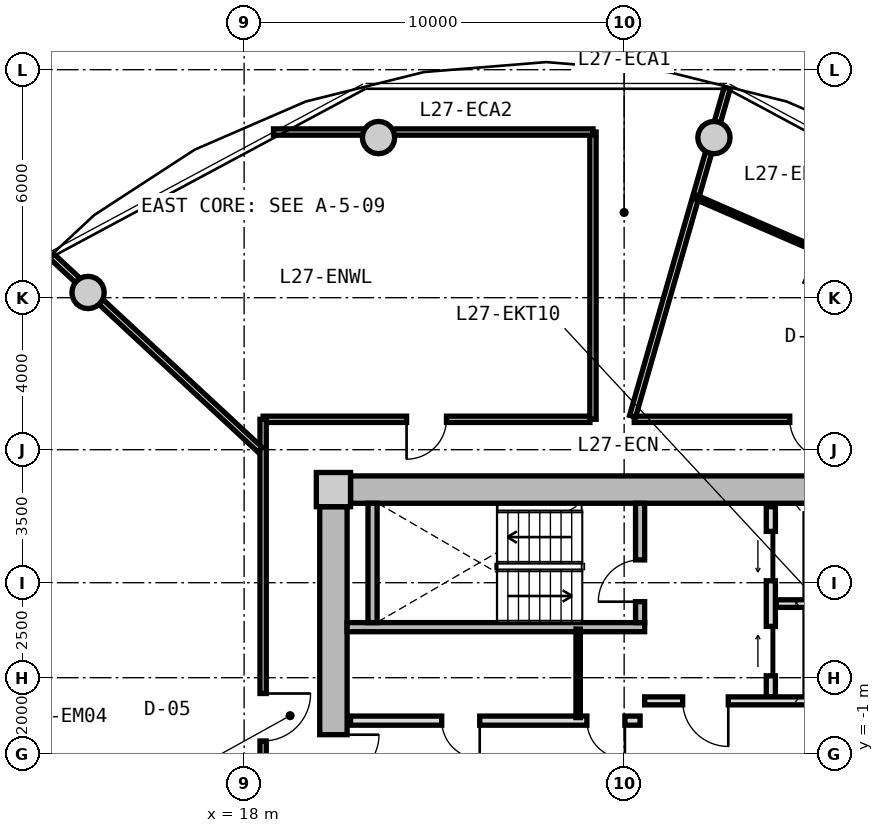
"""IFC4 building model, lengths in metres.
Left out: names, types, materials, properties, quantities, classifications, styles, units other than length and angle.
Written with IfcOpenShell. Run it as: python <this file> out.ifc"""

import sys

from ifc_helpers import new_model, si_unit, direction, frame, frame_2d, origin, origin_2d, place, context, subcontext, project, spatial, rectangle, circle, extrude, source, transform, mapped, element, fill, save


model = new_model("IFC4")
c1 = context("Model", 3, precision=1e-05, world=origin(), true_north=direction((0.0, 1.0)))
c2 = subcontext(c1, "Body", "Model", "MODEL_VIEW")
j1 = project(units=[si_unit("LENGTHUNIT", "METRE"), si_unit("PLANEANGLEUNIT", "RADIAN")], contexts=[c1])
p1 = place(None, origin())
s1 = spatial("IfcSite", under=j1, at=p1, CompositionType="ELEMENT")
p2 = place(p1, origin())
s2 = spatial("IfcBuilding", under=s1, at=p2, CompositionType="ELEMENT")
p3 = place(p2, frame((0.0, 0.0, 90.15)))
s3 = spatial("IfcBuildingStorey", under=s2, at=p3, CompositionType="ELEMENT", Elevation=90.15)
m1 = source(origin(), c2, "Body", "SweptSolid", [
    extrude(rectangle(XDim=0.9, YDim=0.9, at=origin_2d()), origin(), (0.0, 0.0, 1.0), 3.05),
])
p4 = place(p3, frame((20.35, 5.95, 0.0), z_axis=(0.0, 0.0, 1.0), x_axis=(1.0, 0.0, 0.0)))
e1 = element("IfcColumn", 1, at=p4, inside=s3, PredefinedType="COLUMN", context=c2, shape_type="MappedRepresentation", body=[
    mapped(m1, transform((0.0, 0.0, 0.0), x_axis=(1.0, 0.0, 0.0), y_axis=(0.0, 1.0, 0.0), z_axis=(0.0, 0.0, 1.0), scale=1.0)),
])
m2 = source(origin(), c2, "Body", "SweptSolid", [
    extrude(rectangle(XDim=14.4, YDim=0.72, at=frame_2d((7.2, 0.0))), origin(), (0.0, 0.0, 1.0), 2.79),
])
p5 = place(p3, frame((20.8, 5.95, 0.0), z_axis=(0.0, 0.0, 1.0), x_axis=(1.0, 0.0, 0.0)))
e2 = element("IfcWall", 2, at=p5, inside=s3, PredefinedType="SHEAR", context=c2, shape_type="MappedRepresentation", body=[
    mapped(m2, transform((0.0, 0.0, 0.0), x_axis=(1.0, 0.0, 0.0), y_axis=(0.0, 1.0, 0.0), z_axis=(0.0, 0.0, 1.0), scale=1.0)),
])
m3 = source(origin(), c2, "Body", "SweptSolid", [
    extrude(rectangle(XDim=11.0, YDim=0.72, at=frame_2d((5.5, 0.0))), origin(), (0.0, 0.0, 1.0), 2.79),
])
p6 = place(p3, frame((20.35, -5.5, 0.0), z_axis=(0.0, 0.0, 1.0), x_axis=(0.0, 1.0, 0.0)))
e3 = element("IfcWall", 3, at=p6, inside=s3, PredefinedType="SHEAR", context=c2, shape_type="MappedRepresentation", body=[
    mapped(m3, transform((0.0, 0.0, 0.0), x_axis=(1.0, 0.0, 0.0), y_axis=(0.0, 1.0, 0.0), z_axis=(0.0, 0.0, 1.0), scale=1.0)),
])
p7 = place(p6, frame((3.8, 0.0, 0.0)))
e4 = element("IfcOpeningElement", 4, at=p7, cuts=e3, PredefinedType="OPENING", context=c2, shape_type="SweptSolid", body=[
    extrude(rectangle(XDim=1.2, YDim=2.15, at=frame_2d((0.6, 1.075))), frame((0.0, 0.37, 0.0), z_axis=(0.0, -1.0, 0.0), x_axis=(1.0, 0.0, 0.0)), (0.0, 0.0, 1.0), 0.74),
])
m4 = source(origin(), c2, "Body", "SweptSolid", [
    extrude(circle(Radius=0.425, at=origin_2d()), origin(), (0.0, 0.0, 1.0), 3.05),
])
for number, where, z_axis, x_axis in (
    (5, (30.363, 15.213, 0.0), (0.0, 0.0, 1.0), (1.0, 0.0, 0.0)),
    (6, (21.537, 15.213, 0.0), (0.0, 0.0, 1.0), (1.0, 0.0, 0.0)),
    (7, (13.894, 11.137, 0.0), (0.0, 0.0, 1.0), (1.0, 0.0, 0.0)),
):
    element("IfcColumn", number, at=place(p3, frame(where, z_axis=z_axis, x_axis=x_axis)), inside=s3, PredefinedType="COLUMN", context=c2, shape_type="MappedRepresentation", body=[
        mapped(m4, transform((0.0, 0.0, 0.0), x_axis=(1.0, 0.0, 0.0), y_axis=(0.0, 1.0, 0.0), z_axis=(0.0, 0.0, 1.0), scale=1.0)),
    ])
m5 = source(origin(), c2, "Body", "SweptSolid", [
    extrude(rectangle(XDim=7.83, YDim=0.24, at=frame_2d((3.915, 0.0))), origin(), (0.0, 0.0, 1.0), 2.79),
])
p8 = place(p3, frame((20.71, 2.33, 0.0), z_axis=(0.0, 0.0, 1.0), x_axis=(1.0, 0.0, 0.0)))
e8 = element("IfcWall", 8, at=p8, inside=s3, PredefinedType="PARTITIONING", context=c2, shape_type="MappedRepresentation", body=[
    mapped(m5, transform((0.0, 0.0, 0.0), x_axis=(1.0, 0.0, 0.0), y_axis=(0.0, 1.0, 0.0), z_axis=(0.0, 0.0, 1.0), scale=1.0)),
])
m6 = source(origin(), c2, "Body", "SweptSolid", [
    extrude(rectangle(XDim=3.14, YDim=0.24, at=frame_2d((1.57, 0.0))), origin(), (0.0, 0.0, 1.0), 2.79),
])
p9 = place(p3, frame((21.38, 2.45, 0.0), z_axis=(0.0, 0.0, 1.0), x_axis=(0.0, 1.0, 0.0)))
e9 = element("IfcWall", 9, at=p9, inside=s3, PredefinedType="PARTITIONING", context=c2, shape_type="MappedRepresentation", body=[
    mapped(m6, transform((0.0, 0.0, 0.0), x_axis=(1.0, 0.0, 0.0), y_axis=(0.0, 1.0, 0.0), z_axis=(0.0, 0.0, 1.0), scale=1.0)),
])
p10 = place(p3, frame((28.42, 2.45, 0.0), z_axis=(0.0, 0.0, 1.0), x_axis=(0.0, 1.0, 0.0)))
e10 = element("IfcWall", 10, at=p10, inside=s3, PredefinedType="PARTITIONING", context=c2, shape_type="MappedRepresentation", body=[
    mapped(m6, transform((0.0, 0.0, 0.0), x_axis=(1.0, 0.0, 0.0), y_axis=(0.0, 1.0, 0.0), z_axis=(0.0, 0.0, 1.0), scale=1.0)),
])
p11 = place(p10, frame((0.55, 0.0, 0.0)))
e11 = element("IfcOpeningElement", 11, at=p11, cuts=e10, PredefinedType="OPENING", context=c2, shape_type="SweptSolid", body=[
    extrude(rectangle(XDim=1.1, YDim=2.15, at=frame_2d((0.55, 1.075))), frame((0.0, 0.13, 0.0), z_axis=(0.0, -1.0, 0.0), x_axis=(1.0, 0.0, 0.0)), (0.0, 0.0, 1.0), 0.26),
])
m7 = source(origin(), c2, "Body", "SweptSolid", [
    extrude(rectangle(XDim=5.0, YDim=0.24, at=frame_2d((2.5, 0.0))), origin(), (0.0, 0.0, 1.0), 2.775),
])
p12 = place(p3, frame((31.86, 0.5, 0.0), z_axis=(0.0, 0.0, 1.0), x_axis=(0.0, 1.0, 0.0)))
e12 = element("IfcWall", 12, at=p12, inside=s3, PredefinedType="PARTITIONING", context=c2, shape_type="MappedRepresentation", body=[
    mapped(m7, transform((0.0, 0.0, 0.0), x_axis=(1.0, 0.0, 0.0), y_axis=(0.0, 1.0, 0.0), z_axis=(0.0, 0.0, 1.0), scale=1.0)),
])
p13 = place(p12, frame((3.05, 0.0, 0.0)))
e13 = element("IfcOpeningElement", 13, at=p13, cuts=e12, PredefinedType="OPENING", context=c2, shape_type="SweptSolid", body=[
    extrude(rectangle(XDim=1.3, YDim=2.2, at=frame_2d((0.65, 1.1))), frame((0.0, 0.13, 0.0), z_axis=(0.0, -1.0, 0.0), x_axis=(1.0, 0.0, 0.0)), (0.0, 0.0, 1.0), 0.26),
])
p14 = place(p12, frame((0.55, 0.0, 0.0)))
e14 = element("IfcOpeningElement", 14, at=p14, cuts=e12, PredefinedType="OPENING", context=c2, shape_type="SweptSolid", body=[
    extrude(rectangle(XDim=1.3, YDim=2.2, at=frame_2d((0.65, 1.1))), frame((0.0, 0.13, 0.0), z_axis=(0.0, -1.0, 0.0), x_axis=(1.0, 0.0, 0.0)), (0.0, 0.0, 1.0), 0.26),
])
m8 = source(origin(), c2, "Body", "SweptSolid", [
    extrude(rectangle(XDim=3.2, YDim=0.2, at=frame_2d((1.6, 0.0))), origin(), (0.0, 0.0, 1.0), 2.775),
])
p15 = place(p3, frame((32.0, 2.95, 0.0), z_axis=(0.0, 0.0, 1.0), x_axis=(1.0, 0.0, 0.0)))
e15 = element("IfcWall", 15, at=p15, inside=s3, PredefinedType="PARTITIONING", context=c2, shape_type="MappedRepresentation", body=[
    mapped(m8, transform((0.0, 0.0, 0.0), x_axis=(1.0, 0.0, 0.0), y_axis=(0.0, 1.0, 0.0), z_axis=(0.0, 0.0, 1.0), scale=1.0)),
])
m9 = source(origin(), c2, "Body", "SweptSolid", [
    extrude(rectangle(XDim=6.66, YDim=0.21, at=frame_2d((3.33, 0.0))), origin(), (0.0, 0.0, 1.0), 2.775),
])
p16 = place(p3, frame((28.54, 0.39, 0.0), z_axis=(0.0, 0.0, 1.0), x_axis=(1.0, 0.0, 0.0)))
e16 = element("IfcWall", 16, at=p16, inside=s3, PredefinedType="PARTITIONING", context=c2, shape_type="MappedRepresentation", body=[
    mapped(m9, transform((0.0, 0.0, 0.0), x_axis=(1.0, 0.0, 0.0), y_axis=(0.0, 1.0, 0.0), z_axis=(0.0, 0.0, 1.0), scale=1.0)),
])
p17 = place(p16, frame((1.0, 0.0, 0.0)))
e17 = element("IfcOpeningElement", 17, at=p17, cuts=e16, PredefinedType="OPENING", context=c2, shape_type="SweptSolid", body=[
    extrude(rectangle(XDim=1.2, YDim=2.15, at=frame_2d((0.6, 1.075))), frame((0.0, 0.115, 0.0), z_axis=(0.0, -1.0, 0.0), x_axis=(1.0, 0.0, 0.0)), (0.0, 0.0, 1.0), 0.23),
])
m10 = source(origin(), c2, "Body", "SweptSolid", [
    extrude(rectangle(XDim=7.62, YDim=0.24, at=frame_2d((3.81, 0.0))), origin(), (0.0, 0.0, 1.0), 2.775),
])
p18 = place(p3, frame((20.8, -0.13, 0.0), z_axis=(0.0, 0.0, 1.0), x_axis=(1.0, 0.0, 0.0)))
e18 = element("IfcWall", 18, at=p18, inside=s3, PredefinedType="PARTITIONING", context=c2, shape_type="MappedRepresentation", body=[
    mapped(m10, transform((0.0, 0.0, 0.0), x_axis=(1.0, 0.0, 0.0), y_axis=(0.0, 1.0, 0.0), z_axis=(0.0, 0.0, 1.0), scale=1.0)),
])
p19 = place(p18, frame((6.22, 0.0, 0.0)))
e19 = element("IfcOpeningElement", 19, at=p19, cuts=e18, PredefinedType="OPENING", context=c2, shape_type="SweptSolid", body=[
    extrude(rectangle(XDim=1.0, YDim=2.1, at=frame_2d((0.5, 1.05))), frame((0.0, 0.13, 0.0), z_axis=(0.0, -1.0, 0.0), x_axis=(1.0, 0.0, 0.0)), (0.0, 0.0, 1.0), 0.26),
])
p20 = place(p18, frame((2.4, 0.0, 0.0)))
e20 = element("IfcOpeningElement", 20, at=p20, cuts=e18, PredefinedType="OPENING", context=c2, shape_type="SweptSolid", body=[
    extrude(rectangle(XDim=1.0, YDim=2.1, at=frame_2d((0.5, 1.05))), frame((0.0, 0.13, 0.0), z_axis=(0.0, -1.0, 0.0), x_axis=(1.0, 0.0, 0.0)), (0.0, 0.0, 1.0), 0.26),
])
m11 = source(origin(), c2, "Body", "SweptSolid", [
    extrude(rectangle(XDim=2.33, YDim=0.115, at=frame_2d((1.165, 0.0))), origin(), (0.0, 0.0, 1.0), 2.775),
])
p21 = place(p3, frame((26.79, -0.05, 0.0), z_axis=(0.0, 0.0, 1.0), x_axis=(0.0, 1.0, 0.0)))
e21 = element("IfcWall", 21, at=p21, inside=s3, PredefinedType="PARTITIONING", context=c2, shape_type="MappedRepresentation", body=[
    mapped(m11, transform((0.0, 0.0, 0.0), x_axis=(1.0, 0.0, 0.0), y_axis=(0.0, 1.0, 0.0), z_axis=(0.0, 0.0, 1.0), scale=1.0)),
])
m12 = source(origin(), c2, "Body", "SweptSolid", [
    extrude(rectangle(XDim=8.6, YDim=0.165, at=frame_2d((4.3, 0.0))), origin(), (0.0, 0.0, 1.0), 2.775),
])
p22 = place(p3, frame((18.5, 7.8, 0.0), z_axis=(0.0, 0.0, 1.0), x_axis=(1.0, 0.0, 0.0)))
e22 = element("IfcWall", 22, at=p22, inside=s3, PredefinedType="PARTITIONING", context=c2, shape_type="MappedRepresentation", body=[
    mapped(m12, transform((0.0, 0.0, 0.0), x_axis=(1.0, 0.0, 0.0), y_axis=(0.0, 1.0, 0.0), z_axis=(0.0, 0.0, 1.0), scale=1.0)),
])
p23 = place(p22, frame((3.775, 0.0, 0.0)))
e23 = element("IfcOpeningElement", 23, at=p23, cuts=e22, PredefinedType="OPENING", context=c2, shape_type="SweptSolid", body=[
    extrude(rectangle(XDim=1.05, YDim=2.15, at=frame_2d((0.525, 1.075))), frame((0.0, 0.093, 0.0), z_axis=(0.0, -1.0, 0.0), x_axis=(1.0, 0.0, 0.0)), (0.0, 0.0, 1.0), 0.185),
])
m13 = source(origin(), c2, "Body", "SweptSolid", [
    extrude(rectangle(XDim=9.234, YDim=0.165, at=frame_2d((4.617, 0.0))), origin(), (0.0, 0.0, 1.0), 2.775),
])
p24 = place(p3, frame((28.266, 7.8, 0.0), z_axis=(0.0, 0.0, 1.0), x_axis=(1.0, 0.0, 0.0)))
e24 = element("IfcWall", 24, at=p24, inside=s3, PredefinedType="PARTITIONING", context=c2, shape_type="MappedRepresentation", body=[
    mapped(m13, transform((0.0, 0.0, 0.0), x_axis=(1.0, 0.0, 0.0), y_axis=(0.0, 1.0, 0.0), z_axis=(0.0, 0.0, 1.0), scale=1.0)),
])
p25 = place(p24, frame((4.092, 0.0, 0.0)))
e25 = element("IfcOpeningElement", 25, at=p25, cuts=e24, PredefinedType="OPENING", context=c2, shape_type="SweptSolid", body=[
    extrude(rectangle(XDim=1.05, YDim=2.15, at=frame_2d((0.525, 1.075))), frame((0.0, 0.093, 0.0), z_axis=(0.0, -1.0, 0.0), x_axis=(1.0, 0.0, 0.0)), (0.0, 0.0, 1.0), 0.185),
])
m14 = source(origin(), c2, "Body", "SweptSolid", [
    extrude(rectangle(XDim=15.6, YDim=0.165, at=frame_2d((7.8, 0.0))), origin(), (0.0, 0.0, 1.0), 2.775),
])
p26 = place(p3, frame((18.5, -7.8, 0.0), z_axis=(0.0, 0.0, 1.0), x_axis=(0.0, 1.0, 0.0)))
e26 = element("IfcWall", 26, at=p26, inside=s3, PredefinedType="PARTITIONING", context=c2, shape_type="MappedRepresentation", body=[
    mapped(m14, transform((0.0, 0.0, 0.0), x_axis=(1.0, 0.0, 0.0), y_axis=(0.0, 1.0, 0.0), z_axis=(0.0, 0.0, 1.0), scale=1.0)),
])
p27 = place(p26, frame((7.134, 0.0, 0.0)))
e27 = element("IfcOpeningElement", 27, at=p27, cuts=e26, PredefinedType="OPENING", context=c2, shape_type="SweptSolid", body=[
    extrude(rectangle(XDim=1.25, YDim=2.2, at=frame_2d((0.625, 1.1))), frame((0.0, 0.093, 0.0), z_axis=(0.0, -1.0, 0.0), x_axis=(1.0, 0.0, 0.0)), (0.0, 0.0, 1.0), 0.185),
])
m15 = source(origin(), c2, "Body", "SweptSolid", [
    extrude(rectangle(XDim=8.989, YDim=0.165, at=frame_2d((4.495, 0.0))), origin(), (0.0, 0.0, 1.0), 2.275),
])
p28 = place(p3, frame((28.222, 7.88, 0.0), z_axis=(0.0, 0.0, 1.0), x_axis=(0.27702323008, 0.960863221274, 0.0)))
e28 = element("IfcWall", 28, at=p28, inside=s3, PredefinedType="PARTITIONING", context=c2, shape_type="MappedRepresentation", body=[
    mapped(m15, transform((0.0, 0.0, 0.0), x_axis=(1.0, 0.0, 0.0), y_axis=(0.0, 1.0, 0.0), z_axis=(0.0, 0.0, 1.0), scale=1.0)),
])
m16 = source(origin(), c2, "Body", "SweptSolid", [
    extrude(rectangle(XDim=7.482, YDim=0.165, at=frame_2d((3.741, 0.0))), origin(), (0.0, 0.0, 1.0), 2.275),
])
p29 = place(p3, frame((18.42, 6.998, 0.0), z_axis=(0.0, 0.0, 1.0), x_axis=(-0.732508698043, 0.680757671489, 0.0)))
e29 = element("IfcWall", 29, at=p29, inside=s3, PredefinedType="PARTITIONING", context=c2, shape_type="MappedRepresentation", body=[
    mapped(m16, transform((0.0, 0.0, 0.0), x_axis=(1.0, 0.0, 0.0), y_axis=(0.0, 1.0, 0.0), z_axis=(0.0, 0.0, 1.0), scale=1.0)),
])
m17 = source(origin(), c2, "Body", "SweptSolid", [
    extrude(rectangle(XDim=7.56, YDim=0.165, at=frame_2d((3.78, 0.0))), origin(), (0.0, 0.0, 1.0), 2.775),
])
p30 = place(p3, frame((27.18, 7.8, 0.0), z_axis=(0.0, 0.0, 1.0), x_axis=(0.0, 1.0, 0.0)))
e30 = element("IfcWall", 30, at=p30, inside=s3, PredefinedType="PARTITIONING", context=c2, shape_type="MappedRepresentation", body=[
    mapped(m17, transform((0.0, 0.0, 0.0), x_axis=(1.0, 0.0, 0.0), y_axis=(0.0, 1.0, 0.0), z_axis=(0.0, 0.0, 1.0), scale=1.0)),
])
m18 = source(origin(), c2, "Body", "SweptSolid", [
    extrude(rectangle(XDim=8.407, YDim=0.165, at=frame_2d((4.204, 0.0))), origin(), (0.0, 0.0, 1.0), 2.275),
])
p31 = place(p3, frame((18.773, 15.36, 0.0), z_axis=(0.0, 0.0, 1.0), x_axis=(1.0, 0.0, 0.0)))
e31 = element("IfcWall", 31, at=p31, inside=s3, PredefinedType="PARTITIONING", context=c2, shape_type="MappedRepresentation", body=[
    mapped(m18, transform((0.0, 0.0, 0.0), x_axis=(1.0, 0.0, 0.0), y_axis=(0.0, 1.0, 0.0), z_axis=(0.0, 0.0, 1.0), scale=1.0)),
])
m19 = source(origin(), c2, "Body", "SweptSolid", [
    extrude(rectangle(XDim=7.938, YDim=0.115, at=frame_2d((3.969, 0.0))), origin(), (0.0, 0.0, 1.0), 2.775),
])
p32 = place(p3, frame((37.164, 10.479, 0.0), z_axis=(0.0, 0.0, 1.0), x_axis=(-0.917052940979, 0.398765474235, 0.0)))
e32 = element("IfcWall", 32, at=p32, inside=s3, PredefinedType="PARTITIONING", context=c2, shape_type="MappedRepresentation", body=[
    mapped(m19, transform((0.0, 0.0, 0.0), x_axis=(1.0, 0.0, 0.0), y_axis=(0.0, 1.0, 0.0), z_axis=(0.0, 0.0, 1.0), scale=1.0)),
])
p33 = place(p32, frame((3.494, 0.0, 0.0)))
e33 = element("IfcOpeningElement", 33, at=p33, cuts=e32, PredefinedType="OPENING", context=c2, shape_type="SweptSolid", body=[
    extrude(rectangle(XDim=0.95, YDim=2.1, at=frame_2d((0.475, 1.05))), frame((0.0, 0.067, 0.0), z_axis=(0.0, -1.0, 0.0), x_axis=(1.0, 0.0, 0.0)), (0.0, 0.0, 1.0), 0.135),
])
m20 = source(origin(), c2, "Body", "SweptSolid", [
    extrude(rectangle(XDim=1.1, YDim=2.15, at=frame_2d((0.55, 1.075))), frame((0.0, 0.025, 0.0), z_axis=(0.0, -1.0, 0.0), x_axis=(1.0, 0.0, 0.0)), (0.0, 0.0, 1.0), 0.05),
])
p34 = place(p11, origin())
e34 = element("IfcDoor", 34, at=p34, inside=s3, OperationType="SINGLE_SWING_LEFT", PredefinedType="DOOR", context=c2, shape_type="MappedRepresentation", body=[
    mapped(m20, transform((0.0, 0.0, 0.0), x_axis=(1.0, 0.0, 0.0), y_axis=(0.0, 1.0, 0.0), z_axis=(0.0, 0.0, 1.0), scale=1.0)),
])
fill(e11, e34)
m21 = source(origin(), c2, "Body", "SweptSolid", [
    extrude(rectangle(XDim=1.3, YDim=2.2, at=frame_2d((0.65, 1.1))), frame((0.0, 0.025, 0.0), z_axis=(0.0, -1.0, 0.0), x_axis=(1.0, 0.0, 0.0)), (0.0, 0.0, 1.0), 0.05),
])
p35 = place(p13, origin())
e35 = element("IfcDoor", 35, at=p35, inside=s3, OperationType="SLIDING_TO_LEFT", PredefinedType="DOOR", context=c2, shape_type="MappedRepresentation", body=[
    mapped(m21, transform((0.0, 0.0, 0.0), x_axis=(1.0, 0.0, 0.0), y_axis=(0.0, 1.0, 0.0), z_axis=(0.0, 0.0, 1.0), scale=1.0)),
])
fill(e13, e35)
p36 = place(p14, origin())
e36 = element("IfcDoor", 36, at=p36, inside=s3, OperationType="SLIDING_TO_RIGHT", PredefinedType="DOOR", context=c2, shape_type="MappedRepresentation", body=[
    mapped(m21, transform((0.0, 0.0, 0.0), x_axis=(1.0, 0.0, 0.0), y_axis=(0.0, 1.0, 0.0), z_axis=(0.0, 0.0, 1.0), scale=1.0)),
])
fill(e14, e36)
m22 = source(origin(), c2, "Body", "SweptSolid", [
    extrude(rectangle(XDim=1.2, YDim=2.15, at=frame_2d((0.6, 1.075))), frame((0.0, 0.025, 0.0), z_axis=(0.0, -1.0, 0.0), x_axis=(1.0, 0.0, 0.0)), (0.0, 0.0, 1.0), 0.05),
])
p37 = place(p17, frame((1.2, 0.0, 0.0), z_axis=(0.0, 0.0, 1.0), x_axis=(-1.0, 0.0, 0.0)))
e37 = element("IfcDoor", 37, at=p37, inside=s3, OperationType="SINGLE_SWING_LEFT", PredefinedType="DOOR", context=c2, shape_type="MappedRepresentation", body=[
    mapped(m22, transform((0.0, 0.0, 0.0), x_axis=(1.0, 0.0, 0.0), y_axis=(0.0, 1.0, 0.0), z_axis=(0.0, 0.0, 1.0), scale=1.0)),
])
fill(e17, e37)
p38 = place(p7, frame((1.2, 0.0, 0.0), z_axis=(0.0, 0.0, 1.0), x_axis=(-1.0, 0.0, 0.0)))
e38 = element("IfcDoor", 38, at=p38, inside=s3, OperationType="SINGLE_SWING_LEFT", PredefinedType="DOOR", context=c2, shape_type="MappedRepresentation", body=[
    mapped(m22, transform((0.0, 0.0, 0.0), x_axis=(1.0, 0.0, 0.0), y_axis=(0.0, 1.0, 0.0), z_axis=(0.0, 0.0, 1.0), scale=1.0)),
])
fill(e4, e38)
m23 = source(origin(), c2, "Body", "SweptSolid", [
    extrude(rectangle(XDim=1.0, YDim=2.1, at=frame_2d((0.5, 1.05))), frame((0.0, 0.025, 0.0), z_axis=(0.0, -1.0, 0.0), x_axis=(1.0, 0.0, 0.0)), (0.0, 0.0, 1.0), 0.05),
])
p39 = place(p19, frame((1.0, 0.0, 0.0), z_axis=(0.0, 0.0, 1.0), x_axis=(-1.0, 0.0, 0.0)))
e39 = element("IfcDoor", 39, at=p39, inside=s3, OperationType="SINGLE_SWING_LEFT", PredefinedType="DOOR", context=c2, shape_type="MappedRepresentation", body=[
    mapped(m23, transform((0.0, 0.0, 0.0), x_axis=(1.0, 0.0, 0.0), y_axis=(0.0, 1.0, 0.0), z_axis=(0.0, 0.0, 1.0), scale=1.0)),
])
fill(e19, e39)
p40 = place(p20, frame((1.0, 0.0, 0.0), z_axis=(0.0, 0.0, 1.0), x_axis=(-1.0, 0.0, 0.0)))
e40 = element("IfcDoor", 40, at=p40, inside=s3, OperationType="SINGLE_SWING_LEFT", PredefinedType="DOOR", context=c2, shape_type="MappedRepresentation", body=[
    mapped(m23, transform((0.0, 0.0, 0.0), x_axis=(1.0, 0.0, 0.0), y_axis=(0.0, 1.0, 0.0), z_axis=(0.0, 0.0, 1.0), scale=1.0)),
])
fill(e20, e40)
m24 = source(origin(), c2, "Body", "SweptSolid", [
    extrude(rectangle(XDim=1.05, YDim=2.15, at=frame_2d((0.525, 1.075))), frame((0.0, 0.025, 0.0), z_axis=(0.0, -1.0, 0.0), x_axis=(1.0, 0.0, 0.0)), (0.0, 0.0, 1.0), 0.05),
])
p41 = place(p23, frame((1.05, 0.0, 0.0), z_axis=(0.0, 0.0, 1.0), x_axis=(-1.0, 0.0, 0.0)))
e41 = element("IfcDoor", 41, at=p41, inside=s3, OperationType="SINGLE_SWING_RIGHT", PredefinedType="DOOR", context=c2, shape_type="MappedRepresentation", body=[
    mapped(m24, transform((0.0, 0.0, 0.0), x_axis=(1.0, 0.0, 0.0), y_axis=(0.0, 1.0, 0.0), z_axis=(0.0, 0.0, 1.0), scale=1.0)),
])
fill(e23, e41)
m25 = source(origin(), c2, "Body", "SweptSolid", [
    extrude(rectangle(XDim=1.25, YDim=2.2, at=frame_2d((0.625, 1.1))), frame((0.0, 0.025, 0.0), z_axis=(0.0, -1.0, 0.0), x_axis=(1.0, 0.0, 0.0)), (0.0, 0.0, 1.0), 0.05),
])
p42 = place(p27, frame((1.25, 0.0, 0.0), z_axis=(0.0, 0.0, 1.0), x_axis=(-1.0, 0.0, 0.0)))
e42 = element("IfcDoor", 42, at=p42, inside=s3, OperationType="SINGLE_SWING_LEFT", PredefinedType="DOOR", context=c2, shape_type="MappedRepresentation", body=[
    mapped(m25, transform((0.0, 0.0, 0.0), x_axis=(1.0, 0.0, 0.0), y_axis=(0.0, 1.0, 0.0), z_axis=(0.0, 0.0, 1.0), scale=1.0)),
])
fill(e27, e42)
p43 = place(p25, frame((1.05, 0.0, 0.0), z_axis=(0.0, 0.0, 1.0), x_axis=(-1.0, 0.0, 0.0)))
e43 = element("IfcDoor", 43, at=p43, inside=s3, OperationType="SINGLE_SWING_LEFT", PredefinedType="DOOR", context=c2, shape_type="MappedRepresentation", body=[
    mapped(m24, transform((0.0, 0.0, 0.0), x_axis=(1.0, 0.0, 0.0), y_axis=(0.0, 1.0, 0.0), z_axis=(0.0, 0.0, 1.0), scale=1.0)),
])
fill(e25, e43)
save(model, sys.argv[1])
